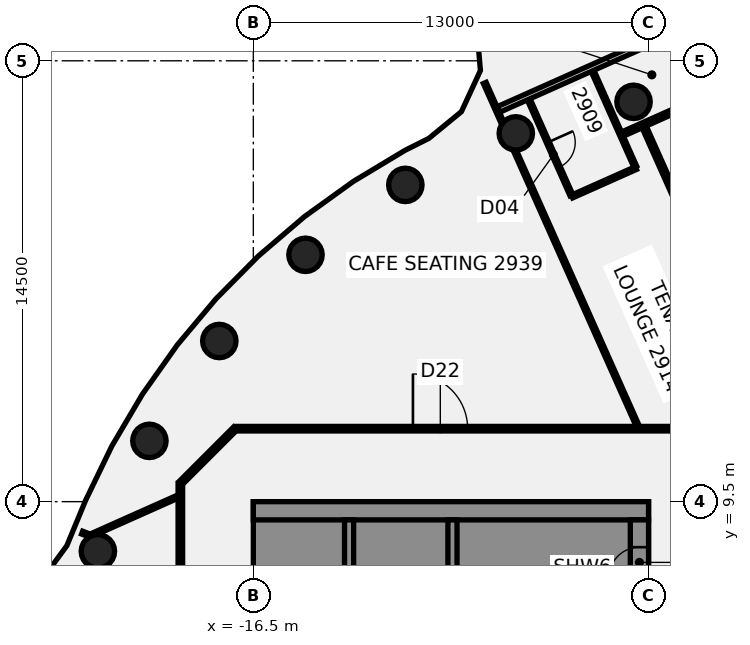
"""IFC4 building model, lengths in metres.
Left out: names, types, materials, properties, quantities, classifications, styles, units other than length and angle.
Written with IfcOpenShell. Run it as: python <this file> out.ifc"""

import sys

from ifc_helpers import new_model, si_unit, direction, frame, frame_2d, origin, origin_2d, place, context, subcontext, project, spatial, polyline, rectangle, circle, outline, extrude, element, fill, save


model = new_model("IFC4")
c1 = context("Model", 3, precision=1e-05, world=origin(), true_north=direction((0.0, 1.0)))
c2 = subcontext(c1, "Body", "Model", "MODEL_VIEW")
j1 = project(units=[si_unit("LENGTHUNIT", "METRE"), si_unit("PLANEANGLEUNIT", "RADIAN")], contexts=[c1])
p1 = place(None, origin())
s1 = spatial("IfcSite", under=j1, at=p1, CompositionType="ELEMENT")
p2 = place(p1, origin())
s2 = spatial("IfcBuilding", under=s1, at=p2, CompositionType="ELEMENT")
p3 = place(p2, frame((0.0, 0.0, 121.0)))
s3 = spatial("IfcBuildingStorey", under=s2, at=p3, CompositionType="ELEMENT", Elevation=121.0)
for number, where, z_axis, x_axis in (
    (1, (-3.994, 22.651, -0.14), (0.0, 0.0, 1.0), (1.0, 0.0, 0.0)),
    (2, (-7.866, 21.613, -0.14), (0.0, 0.0, 1.0), (1.0, 0.0, 0.0)),
    (3, (-11.5, 19.919, -0.14), (0.0, 0.0, 1.0), (1.0, 0.0, 0.0)),
    (4, (-14.784, 17.619, -0.14), (0.0, 0.0, 1.0), (1.0, 0.0, 0.0)),
    (5, (-17.619, 14.784, -0.14), (0.0, 0.0, 1.0), (1.0, 0.0, 0.0)),
    (6, (-19.919, 11.5, -0.14), (0.0, 0.0, 1.0), (1.0, 0.0, 0.0)),
    (7, (-21.613, 7.866, -0.14), (0.0, 0.0, 1.0), (1.0, 0.0, 0.0)),
):
    element("IfcColumn", number, at=place(p3, frame(where, z_axis=z_axis, x_axis=x_axis)), inside=s3, PredefinedType="COLUMN", context=c2, shape_type="SweptSolid", body=[
        extrude(circle(Radius=0.55, at=origin_2d()), origin(), (0.0, 0.0, 1.0), 3.75),
    ])
p4 = place(p3, frame((-8.888, 23.271, 0.0), z_axis=(0.0, 0.0, 1.0), x_axis=(0.407169385214, -0.913352665592, 0.0)))
e8 = element("IfcWall", 8, at=p4, inside=s3, PredefinedType="PARTITIONING", context=c2, shape_type="SweptSolid", body=[
    extrude(rectangle(XDim=1.45, YDim=0.1, at=frame_2d((0.725, 0.0))), origin(), (0.0, 0.0, 1.0), 3.01),
])
p5 = place(p3, frame((-7.903, 21.063, 0.0), z_axis=(0.0, 0.0, 1.0), x_axis=(0.407201659526, -0.913338277135, 0.0)))
e9 = element("IfcWall", 9, at=p5, inside=s3, PredefinedType="PARTITIONING", context=c2, shape_type="SweptSolid", body=[
    extrude(rectangle(XDim=9.947, YDim=0.1, at=frame_2d((4.974, 0.0))), origin(), (0.0, 0.0, 1.0), 3.01),
])
p6 = place(p3, frame((-7.443, 22.733, 0.0), z_axis=(0.0, 0.0, 1.0), x_axis=(0.407260938579, -0.913311845925, 0.0)))
e10 = element("IfcWall", 10, at=p6, inside=s3, PredefinedType="PARTITIONING", context=c2, shape_type="SweptSolid", body=[
    extrude(rectangle(XDim=3.45, YDim=0.1, at=frame_2d((1.725, 0.0))), origin(), (0.0, 0.0, 1.0), 3.01),
])
p7 = place(p6, frame((1.55, 0.0, 0.0)))
e11 = element("IfcOpeningElement", 11, at=p7, cuts=e10, PredefinedType="OPENING", context=c2, shape_type="SweptSolid", body=[
    extrude(rectangle(XDim=0.9, YDim=2.1, at=frame_2d((0.45, 1.05))), frame((0.0, 0.06, 0.0), z_axis=(0.0, -1.0, 0.0), x_axis=(1.0, 0.0, 0.0)), (0.0, 0.0, 1.0), 0.12),
])
p8 = place(p3, frame((-6.278, 33.134, 0.0), z_axis=(0.0, 0.0, 1.0), x_axis=(0.407230206281, -0.913325549348, 0.0)))
e12 = element("IfcWall", 12, at=p8, inside=s3, PredefinedType="PARTITIONING", context=c2, shape_type="SweptSolid", body=[
    extrude(rectangle(XDim=11.305, YDim=0.15, at=frame_2d((5.653, 0.0))), origin(), (0.0, 0.0, 1.0), 3.01),
])
p9 = place(p8, frame((9.375, 0.0, 0.0)))
e13 = element("IfcOpeningElement", 13, at=p9, cuts=e12, PredefinedType="OPENING", context=c2, shape_type="SweptSolid", body=[
    extrude(rectangle(XDim=1.0, YDim=2.1, at=frame_2d((0.5, 1.05))), frame((0.0, 0.085, 0.0), z_axis=(0.0, -1.0, 0.0), x_axis=(1.0, 0.0, 0.0)), (0.0, 0.0, 1.0), 0.17),
])
p10 = place(p8, frame((5.175, 0.0, 0.0)))
e14 = element("IfcOpeningElement", 14, at=p10, cuts=e12, PredefinedType="OPENING", context=c2, shape_type="SweptSolid", body=[
    extrude(rectangle(XDim=0.9, YDim=2.1, at=frame_2d((0.45, 1.05))), frame((0.0, 0.085, 0.0), z_axis=(0.0, -1.0, 0.0), x_axis=(1.0, 0.0, 0.0)), (0.0, 0.0, 1.0), 0.17),
])
p11 = place(p3, frame((-5.342, 23.669, 0.0), z_axis=(0.0, 0.0, 1.0), x_axis=(0.407175588809, -0.913349900026, 0.0)))
e15 = element("IfcWall", 15, at=p11, inside=s3, PredefinedType="PARTITIONING", context=c2, shape_type="SweptSolid", body=[
    extrude(rectangle(XDim=3.45, YDim=0.1, at=frame_2d((1.725, 0.0))), origin(), (0.0, 0.0, 1.0), 3.01),
])
p12 = place(p3, frame((-3.645, 21.825, 0.0), z_axis=(0.0, 0.0, 1.0), x_axis=(0.407223238587, -0.913328656046, 0.0)))
e16 = element("IfcWall", 16, at=p12, inside=s3, PredefinedType="PARTITIONING", context=c2, shape_type="SweptSolid", body=[
    extrude(rectangle(XDim=10.772, YDim=0.15, at=frame_2d((5.386, 0.0))), origin(), (0.0, 0.0, 1.0), 3.01),
])
p13 = place(p12, frame((3.225, 0.0, 0.0)))
e17 = element("IfcOpeningElement", 17, at=p13, cuts=e16, PredefinedType="OPENING", context=c2, shape_type="SweptSolid", body=[
    extrude(rectangle(XDim=1.8, YDim=2.1, at=frame_2d((0.9, 1.05))), frame((0.0, 0.085, 0.0), z_axis=(0.0, -1.0, 0.0), x_axis=(1.0, 0.0, 0.0)), (0.0, 0.0, 1.0), 0.17),
])
p14 = place(p3, frame((-22.131, 8.481, 0.0), z_axis=(0.0, 0.0, 1.0), x_axis=(0.934418057451, -0.356178177193, 0.0)))
e18 = element("IfcWall", 18, at=p14, inside=s3, PredefinedType="PARTITIONING", context=c2, shape_type="SweptSolid", body=[
    extrude(rectangle(XDim=0.222, YDim=0.1, at=frame_2d((0.111, 0.0))), origin(), (0.0, 0.0, 1.0), 3.01),
])
p15 = place(p3, frame((-17.065, 11.9, 0.0), z_axis=(0.0, 0.0, 1.0), x_axis=(1.0, 0.0, 0.0)))
e19 = element("IfcWall", 19, at=p15, inside=s3, PredefinedType="PARTITIONING", context=c2, shape_type="SweptSolid", body=[
    extrude(rectangle(XDim=34.165, YDim=0.15, at=frame_2d((17.083, 0.0))), origin(), (0.0, 0.0, 1.0), 3.01),
])
p16 = place(p15, frame((20.696, 0.0, 0.0)))
e20 = element("IfcOpeningElement", 20, at=p16, cuts=e19, PredefinedType="OPENING", context=c2, shape_type="SweptSolid", body=[
    extrude(rectangle(XDim=1.8, YDim=2.1, at=frame_2d((0.9, 1.05))), frame((0.0, 0.085, 0.0), z_axis=(0.0, -1.0, 0.0), x_axis=(1.0, 0.0, 0.0)), (0.0, 0.0, 1.0), 0.17),
])
p17 = place(p15, frame((29.992, 0.0, 0.0)))
e21 = element("IfcOpeningElement", 21, at=p17, cuts=e19, PredefinedType="OPENING", context=c2, shape_type="SweptSolid", body=[
    extrude(rectangle(XDim=1.8, YDim=2.1, at=frame_2d((0.9, 1.05))), frame((0.0, 0.085, 0.0), z_axis=(0.0, -1.0, 0.0), x_axis=(1.0, 0.0, 0.0)), (0.0, 0.0, 1.0), 0.17),
])
p18 = place(p15, frame((5.815, 0.0, 0.0)))
e22 = element("IfcOpeningElement", 22, at=p18, cuts=e19, PredefinedType="OPENING", context=c2, shape_type="SweptSolid", body=[
    extrude(rectangle(XDim=1.8, YDim=2.1, at=frame_2d((0.9, 1.05))), frame((0.0, 0.085, 0.0), z_axis=(0.0, -1.0, 0.0), x_axis=(1.0, 0.0, 0.0)), (0.0, 0.0, 1.0), 0.17),
])
p19 = place(p3, frame((-21.913, 8.36, 0.0), z_axis=(0.0, 0.0, 1.0), x_axis=(0.913372506339, 0.407124876007, 0.0)))
e23 = element("IfcWall", 23, at=p19, inside=s3, PredefinedType="PARTITIONING", context=c2, shape_type="SweptSolid", body=[
    extrude(rectangle(XDim=3.214, YDim=0.1, at=frame_2d((1.607, 0.0))), origin(), (0.0, 0.0, 1.0), 3.01),
])
p20 = place(p3, frame((-8.434, 22.4, 0.0), z_axis=(0.0, 0.0, 1.0), x_axis=(0.913356347465, 0.407161126023, 0.0)))
e24 = element("IfcWall", 24, at=p20, inside=s3, PredefinedType="PARTITIONING", context=c2, shape_type="SweptSolid", body=[
    extrude(rectangle(XDim=14.239, YDim=0.2, at=frame_2d((7.12, 0.0))), origin(), (0.0, 0.0, 1.0), 3.01),
])
p21 = place(p20, frame((6.94, 0.0, 0.0)))
e25 = element("IfcOpeningElement", 25, at=p21, cuts=e24, PredefinedType="OPENING", context=c2, shape_type="SweptSolid", body=[
    extrude(rectangle(XDim=1.4, YDim=2.1, at=frame_2d((0.7, 1.05))), frame((0.0, 0.11, 0.0), z_axis=(0.0, -1.0, 0.0), x_axis=(1.0, 0.0, 0.0)), (0.0, 0.0, 1.0), 0.22),
])
p22 = place(p3, frame((-6.018, 19.536, 0.0), z_axis=(0.0, 0.0, 1.0), x_axis=(0.913452280911, 0.406945856962, 0.0)))
e26 = element("IfcWall", 26, at=p22, inside=s3, PredefinedType="PARTITIONING", context=c2, shape_type="SweptSolid", body=[
    extrude(rectangle(XDim=2.3, YDim=0.1, at=frame_2d((1.15, 0.0))), origin(), (0.0, 0.0, 1.0), 3.01),
])
p23 = place(p3, frame((-4.356, 21.59, 0.0), z_axis=(0.0, 0.0, 1.0), x_axis=(0.913270631474, 0.40735335237, 0.0)))
e27 = element("IfcWall", 27, at=p23, inside=s3, PredefinedType="PARTITIONING", context=c2, shape_type="SweptSolid", body=[
    extrude(rectangle(XDim=2.945, YDim=0.15, at=frame_2d((1.473, 0.0))), origin(), (0.0, 0.0, 1.0), 3.01),
])
p24 = place(p3, frame((-18.872, 10.128, 0.0), z_axis=(0.0, 0.0, 1.0), x_axis=(0.707106781187, 0.707106781187, 0.0)))
e28 = element("IfcWall", 28, at=p24, inside=s3, PredefinedType="PARTITIONING", context=c2, shape_type="SweptSolid", body=[
    extrude(rectangle(XDim=2.505, YDim=0.15, at=frame_2d((1.253, 0.0))), origin(), (0.0, 0.0, 1.0), 3.01),
])
p25 = place(p3, frame((-18.9, -10.1, 0.0), z_axis=(0.0, 0.0, 1.0), x_axis=(0.0, 1.0, 0.0)))
e29 = element("IfcWall", 29, at=p25, inside=s3, PredefinedType="PARTITIONING", context=c2, shape_type="SweptSolid", body=[
    extrude(rectangle(XDim=20.2, YDim=0.15, at=frame_2d((10.1, 0.0))), origin(), (0.0, 0.0, 1.0), 3.01),
])
p26 = place(p25, frame((9.71, 0.0, 0.0)))
e30 = element("IfcOpeningElement", 30, at=p26, cuts=e29, PredefinedType="OPENING", context=c2, shape_type="SweptSolid", body=[
    extrude(rectangle(XDim=1.8, YDim=2.1, at=frame_2d((0.9, 1.05))), frame((0.0, 0.085, 0.0), z_axis=(0.0, -1.0, 0.0), x_axis=(1.0, 0.0, 0.0)), (0.0, 0.0, 1.0), 0.17),
])
p27 = place(p25, frame((5.561, 0.0, 0.0)))
e31 = element("IfcOpeningElement", 31, at=p27, cuts=e29, PredefinedType="OPENING", context=c2, shape_type="SweptSolid", body=[
    extrude(rectangle(XDim=0.9, YDim=2.1, at=frame_2d((0.45, 1.05))), frame((0.0, 0.085, 0.0), z_axis=(0.0, -1.0, 0.0), x_axis=(1.0, 0.0, 0.0)), (0.0, 0.0, 1.0), 0.17),
])
p28 = place(p3, origin())
e32 = element("IfcWall", 32, at=p28, inside=s3, PredefinedType="SHEAR", context=c2, shape_type="SweptSolid", body=[
    extrude(outline(polyline([(-13.5, -8.9), (-13.5, -8.125), (-15.9, -8.125), (-15.9, -5.625), (-13.5, -5.625), (-13.5, -5.375), (-15.9, -5.375), (-15.9, -2.875), (-13.5, -2.875), (-13.5, -2.625), (-15.9, -2.625), (-15.9, -0.125), (-13.5, -0.125), (-13.5, 0.125), (-15.9, 0.125), (-15.9, 2.625), (-13.5, 2.625), (-13.5, 2.875), (-15.9, 2.875), (-15.9, 5.375), (-13.5, 5.375), (-13.5, 5.625), (-15.9, 5.625), (-15.9, 8.125), (-13.5, 8.125), (-13.5, 8.9), (-15.9, 8.9), (-16.5, 8.9), (-16.5, -8.9), (-15.9, -8.9), (-13.5, -8.9)])), origin(), (0.0, 0.0, 1.0), 3.61),
])
p29 = place(p3, frame((-16.5, 9.2, 0.0), z_axis=(0.0, 0.0, 1.0), x_axis=(1.0, 0.0, 0.0)))
e33 = element("IfcWall", 33, at=p29, inside=s3, PredefinedType="SHEAR", context=c2, shape_type="SweptSolid", body=[
    extrude(rectangle(XDim=13.0, YDim=0.6, at=frame_2d((6.5, 0.0))), origin(), (0.0, 0.0, 1.0), 3.61),
])
p30 = place(p3, origin())
e34 = element("IfcWall", 34, at=p30, inside=s3, PredefinedType="SHEAR", context=c2, shape_type="SweptSolid", body=[
    extrude(outline(polyline([(-9.8, -5.375), (-9.8, -5.625), (-7.5, -5.625), (-7.2, -5.625), (-7.2, 8.9), (-7.5, 8.9), (-9.8, 8.9), (-9.8, 8.125), (-7.5, 8.125), (-7.5, 5.625), (-9.8, 5.625), (-9.8, 5.375), (-7.5, 5.375), (-7.5, 2.875), (-9.8, 2.875), (-9.8, 2.625), (-7.5, 2.625), (-7.5, 0.125), (-9.8, 0.125), (-9.8, -0.125), (-7.5, -0.125), (-7.5, -2.625), (-9.8, -2.625), (-9.8, -2.875), (-7.5, -2.875), (-7.5, -5.375), (-9.8, -5.375)])), origin(), (0.0, 0.0, 1.0), 3.61),
])
p31 = place(p3, frame((-13.35, -8.9, 0.0), z_axis=(0.0, 0.0, 1.0), x_axis=(0.0, 1.0, 0.0)))
e35 = element("IfcWall", 35, at=p31, inside=s3, PredefinedType="SHEAR", context=c2, shape_type="SweptSolid", body=[
    extrude(rectangle(XDim=17.8, YDim=0.3, at=frame_2d((8.9, 0.0))), origin(), (0.0, 0.0, 1.0), 3.61),
])
p32 = place(p31, frame((1.325, 0.0, 0.0)))
e36 = element("IfcOpeningElement", 36, at=p32, cuts=e35, PredefinedType="OPENING", context=c2, shape_type="SweptSolid", body=[
    extrude(rectangle(XDim=1.4, YDim=2.1, at=frame_2d((0.7, 1.05))), frame((0.0, 0.16, 0.0), z_axis=(0.0, -1.0, 0.0), x_axis=(1.0, 0.0, 0.0)), (0.0, 0.0, 1.0), 0.32),
])
p33 = place(p31, frame((4.225, 0.0, 0.0)))
e37 = element("IfcOpeningElement", 37, at=p33, cuts=e35, PredefinedType="OPENING", context=c2, shape_type="SweptSolid", body=[
    extrude(rectangle(XDim=1.1, YDim=2.1, at=frame_2d((0.55, 1.05))), frame((0.0, 0.16, 0.0), z_axis=(0.0, -1.0, 0.0), x_axis=(1.0, 0.0, 0.0)), (0.0, 0.0, 1.0), 0.32),
])
p34 = place(p31, frame((6.975, 0.0, 0.0)))
e38 = element("IfcOpeningElement", 38, at=p34, cuts=e35, PredefinedType="OPENING", context=c2, shape_type="SweptSolid", body=[
    extrude(rectangle(XDim=1.1, YDim=2.1, at=frame_2d((0.55, 1.05))), frame((0.0, 0.16, 0.0), z_axis=(0.0, -1.0, 0.0), x_axis=(1.0, 0.0, 0.0)), (0.0, 0.0, 1.0), 0.32),
])
p35 = place(p31, frame((9.725, 0.0, 0.0)))
e39 = element("IfcOpeningElement", 39, at=p35, cuts=e35, PredefinedType="OPENING", context=c2, shape_type="SweptSolid", body=[
    extrude(rectangle(XDim=1.1, YDim=2.1, at=frame_2d((0.55, 1.05))), frame((0.0, 0.16, 0.0), z_axis=(0.0, -1.0, 0.0), x_axis=(1.0, 0.0, 0.0)), (0.0, 0.0, 1.0), 0.32),
])
p36 = place(p31, frame((12.475, 0.0, 0.0)))
e40 = element("IfcOpeningElement", 40, at=p36, cuts=e35, PredefinedType="OPENING", context=c2, shape_type="SweptSolid", body=[
    extrude(rectangle(XDim=1.1, YDim=2.1, at=frame_2d((0.55, 1.05))), frame((0.0, 0.16, 0.0), z_axis=(0.0, -1.0, 0.0), x_axis=(1.0, 0.0, 0.0)), (0.0, 0.0, 1.0), 0.32),
])
p37 = place(p3, frame((-9.95, -8.9, 0.0), z_axis=(0.0, 0.0, 1.0), x_axis=(0.0, 1.0, 0.0)))
e41 = element("IfcWall", 41, at=p37, inside=s3, PredefinedType="SHEAR", context=c2, shape_type="SweptSolid", body=[
    extrude(rectangle(XDim=17.8, YDim=0.3, at=frame_2d((8.9, 0.0))), origin(), (0.0, 0.0, 1.0), 3.61),
])
p38 = place(p3, frame((-3.8, -8.9, 0.0), z_axis=(0.0, 0.0, 1.0), x_axis=(0.0, 1.0, 0.0)))
e42 = element("IfcWall", 42, at=p38, inside=s3, PredefinedType="SHEAR", context=c2, shape_type="SweptSolid", body=[
    extrude(rectangle(XDim=17.8, YDim=0.6, at=frame_2d((8.9, 0.0))), origin(), (0.0, 0.0, 1.0), 3.61),
])
p39 = place(p38, frame((1.25, 0.0, 0.0)))
e43 = element("IfcOpeningElement", 43, at=p39, cuts=e42, PredefinedType="OPENING", context=c2, shape_type="SweptSolid", body=[
    extrude(rectangle(XDim=1.8, YDim=2.1, at=frame_2d((0.9, 1.05))), frame((0.0, 0.31, 0.0), z_axis=(0.0, -1.0, 0.0), x_axis=(1.0, 0.0, 0.0)), (0.0, 0.0, 1.0), 0.62),
])
p40 = place(p38, frame((12.377, 0.0, 0.0)))
e44 = element("IfcOpeningElement", 44, at=p40, cuts=e42, PredefinedType="OPENING", context=c2, shape_type="SweptSolid", body=[
    extrude(rectangle(XDim=1.0, YDim=2.1, at=frame_2d((0.5, 1.05))), frame((0.0, 0.31, 0.0), z_axis=(0.0, -1.0, 0.0), x_axis=(1.0, 0.0, 0.0)), (0.0, 0.0, 1.0), 0.62),
])
p41 = place(p38, frame((15.903, 0.0, 0.0)))
e45 = element("IfcOpeningElement", 45, at=p41, cuts=e42, PredefinedType="OPENING", context=c2, shape_type="SweptSolid", body=[
    extrude(rectangle(XDim=1.0, YDim=2.1, at=frame_2d((0.5, 1.05))), frame((0.0, 0.31, 0.0), z_axis=(0.0, -1.0, 0.0), x_axis=(1.0, 0.0, 0.0)), (0.0, 0.0, 1.0), 0.62),
])
p42 = place(p7, origin())
e46 = element("IfcDoor", 46, at=p42, inside=s3, OperationType="SINGLE_SWING_LEFT", PredefinedType="DOOR", context=c2, shape_type="SweptSolid", body=[
    extrude(rectangle(XDim=0.9, YDim=2.1, at=frame_2d((0.45, 1.05))), frame((0.0, 0.025, 0.0), z_axis=(0.0, -1.0, 0.0), x_axis=(1.0, 0.0, 0.0)), (0.0, 0.0, 1.0), 0.05),
])
fill(e11, e46)
p43 = place(p18, origin())
e47 = element("IfcDoor", 47, at=p43, inside=s3, OperationType="DOUBLE_DOOR_SINGLE_SWING", PredefinedType="DOOR", context=c2, shape_type="SweptSolid", body=[
    extrude(rectangle(XDim=1.8, YDim=2.1, at=frame_2d((0.9, 1.05))), frame((0.0, 0.025, 0.0), z_axis=(0.0, -1.0, 0.0), x_axis=(1.0, 0.0, 0.0)), (0.0, 0.0, 1.0), 0.05),
])
fill(e22, e47)
p44 = place(p41, origin())
e48 = element("IfcDoor", 48, at=p44, inside=s3, OperationType="SINGLE_SWING_LEFT", PredefinedType="DOOR", context=c2, shape_type="SweptSolid", body=[
    extrude(rectangle(XDim=1.0, YDim=2.1, at=frame_2d((0.5, 1.05))), frame((0.0, 0.275, 0.0), z_axis=(0.0, -1.0, 0.0), x_axis=(1.0, 0.0, 0.0)), (0.0, 0.0, 1.0), 0.05),
])
fill(e45, e48)
save(model, sys.argv[1])
